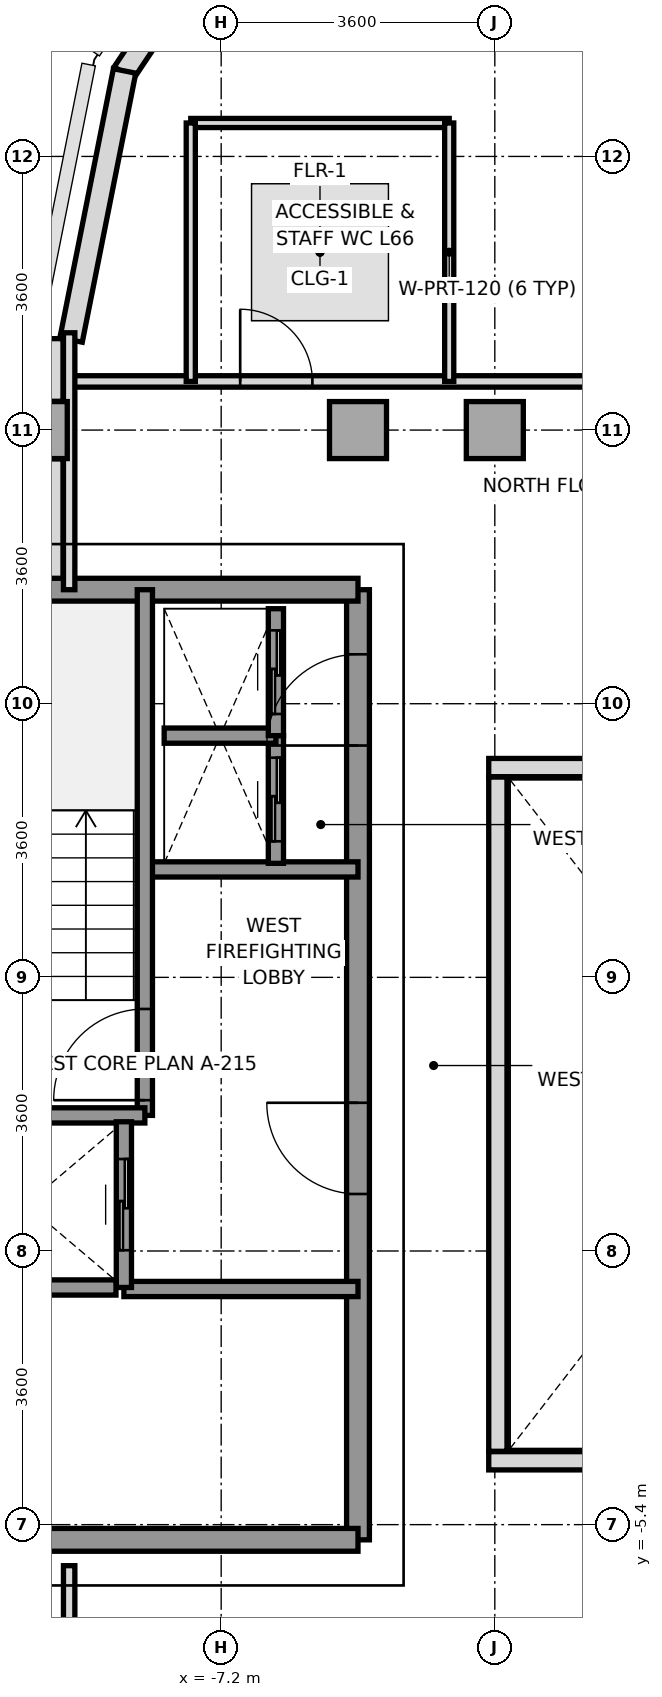
"""IFC4 building model, lengths in metres.
Left out: names, types, materials, properties, quantities, classifications, styles, units other than length and angle.
Written with IfcOpenShell. Run it as: python <this file> out.ifc"""

import sys

from ifc_helpers import new_model, si_unit, direction, frame, frame_2d, origin, origin_2d, place, context, subcontext, project, spatial, rectangle, extrude, source, transform, mapped, element, fill, save


model = new_model("IFC4")
c1 = context("Model", 3, precision=1e-05, world=origin(), true_north=direction((0.0, 1.0)))
c2 = subcontext(c1, "Body", "Model", "MODEL_VIEW")
j1 = project(units=[si_unit("LENGTHUNIT", "METRE"), si_unit("PLANEANGLEUNIT", "RADIAN")], contexts=[c1])
p1 = place(None, origin())
s1 = spatial("IfcSite", under=j1, at=p1, CompositionType="ELEMENT")
p2 = place(p1, origin())
s2 = spatial("IfcBuilding", under=s1, at=p2, CompositionType="ELEMENT")
p3 = place(p2, frame((0.0, 0.0, 239.6)))
s3 = spatial("IfcBuildingStorey", under=s2, at=p3, CompositionType="ELEMENT", Elevation=239.6)
m1 = source(origin(), c2, "Body", "SweptSolid", [
    extrude(rectangle(XDim=0.75, YDim=0.75, at=origin_2d()), origin(), (0.0, 0.0, 1.0), 3.01),
])
for number, where, z_axis, x_axis in (
    (1, (-9.6, 9.0, 0.0), (0.0, 0.0, 1.0), (1.0, 0.0, 0.0)),
    (2, (-5.4, 9.0, 0.0), (0.0, 0.0, 1.0), (1.0, 0.0, 0.0)),
    (3, (-3.6, 9.0, 0.0), (0.0, 0.0, 1.0), (1.0, 0.0, 0.0)),
):
    element("IfcColumn", number, at=place(p3, frame(where, z_axis=z_axis, x_axis=x_axis)), inside=s3, PredefinedType="COLUMN", context=c2, shape_type="MappedRepresentation", body=[
        mapped(m1, transform((0.0, 0.0, 0.0), x_axis=(1.0, 0.0, 0.0), y_axis=(0.0, 1.0, 0.0), z_axis=(0.0, 0.0, 1.0), scale=1.0)),
    ])
p4 = place(p3, frame((-7.305, 15.458, 0.0), z_axis=(0.0, 0.0, 1.0), x_axis=(-0.555604299396, -0.831446848868, 0.0)))
e4 = element("IfcWall", 4, at=p4, inside=s3, PredefinedType="SOLIDWALL", context=c2, shape_type="SweptSolid", body=[
    extrude(rectangle(XDim=2.118, YDim=0.3, at=frame_2d((1.059, 0.0))), origin(), (0.0, 0.0, 1.0), 2.61),
])
p5 = place(p3, frame((-8.471, 13.725, 0.0), z_axis=(0.0, 0.0, 1.0), x_axis=(-0.195114232679, -0.980780523974, 0.0)))
e5 = element("IfcWall", 5, at=p5, inside=s3, PredefinedType="SOLIDWALL", context=c2, shape_type="SweptSolid", body=[
    extrude(rectangle(XDim=3.609, YDim=0.3, at=frame_2d((1.804, 0.0))), origin(), (0.0, 0.0, 1.0), 3.01),
])
p6 = place(p3, frame((-9.4, 6.953, 0.0), z_axis=(0.0, 0.0, 1.0), x_axis=(0.0, 1.0, 0.0)))
e6 = element("IfcWall", 6, at=p6, inside=s3, PredefinedType="PARAPET", context=c2, shape_type="SweptSolid", body=[
    extrude(rectangle(XDim=1.669, YDim=0.24, at=frame_2d((0.834, 0.0))), origin(), (0.0, 0.0, 1.0), 1.15),
])
p7 = place(p3, frame((-9.4, 9.378, 0.0), z_axis=(0.0, 0.0, 1.0), x_axis=(0.0, 1.0, 0.0)))
e7 = element("IfcWall", 7, at=p7, inside=s3, PredefinedType="PARAPET", context=c2, shape_type="SweptSolid", body=[
    extrude(rectangle(XDim=0.825, YDim=0.24, at=frame_2d((0.413, 0.0))), origin(), (0.0, 0.0, 1.0), 1.15),
])
p8 = place(p3, frame((-5.4, -5.6, 0.0), z_axis=(0.0, 0.0, 1.0), x_axis=(0.0, 1.0, 0.0)))
e8 = element("IfcWall", 8, at=p8, inside=s3, PredefinedType="SHEAR", context=c2, shape_type="SweptSolid", body=[
    extrude(rectangle(XDim=12.5, YDim=0.3, at=frame_2d((6.25, 0.0))), origin(), (0.0, 0.0, 1.0), 3.01),
])
p9 = place(p8, frame((4.55, 0.0, 0.0)))
e9 = element("IfcOpeningElement", 9, at=p9, cuts=e8, PredefinedType="OPENING", context=c2, shape_type="SweptSolid", body=[
    extrude(rectangle(XDim=1.2, YDim=2.2, at=frame_2d((0.6, 1.1))), frame((0.0, 0.16, 0.0), z_axis=(0.0, -1.0, 0.0), x_axis=(1.0, 0.0, 0.0)), (0.0, 0.0, 1.0), 0.32),
])
p10 = place(p8, frame((10.45, 0.0, 0.0)))
e10 = element("IfcOpeningElement", 10, at=p10, cuts=e8, PredefinedType="OPENING", context=c2, shape_type="SweptSolid", body=[
    extrude(rectangle(XDim=1.2, YDim=2.2, at=frame_2d((0.6, 1.1))), frame((0.0, 0.16, 0.0), z_axis=(0.0, -1.0, 0.0), x_axis=(1.0, 0.0, 0.0)), (0.0, 0.0, 1.0), 0.32),
])
p11 = place(p3, frame((-11.356, 6.9, 0.0), z_axis=(0.0, 0.0, 1.0), x_axis=(1.0, 0.0, 0.0)))
e11 = element("IfcWall", 11, at=p11, inside=s3, PredefinedType="SHEAR", context=c2, shape_type="SweptSolid", body=[
    extrude(rectangle(XDim=5.956, YDim=0.3, at=frame_2d((2.978, 0.0))), origin(), (0.0, 0.0, 1.0), 3.01),
])
p12 = place(p3, frame((-13.2, -5.6, 0.0), z_axis=(0.0, 0.0, 1.0), x_axis=(1.0, 0.0, 0.0)))
e12 = element("IfcWall", 12, at=p12, inside=s3, PredefinedType="SHEAR", context=c2, shape_type="SweptSolid", body=[
    extrude(rectangle(XDim=7.8, YDim=0.3, at=frame_2d((3.9, 0.0))), origin(), (0.0, 0.0, 1.0), 3.01),
])
p13 = place(p3, frame((-8.18, 3.22, 0.0), z_axis=(0.0, 0.0, 1.0), x_axis=(1.0, 0.0, 0.0)))
e13 = element("IfcWall", 13, at=p13, inside=s3, PredefinedType="SOLIDWALL", context=c2, shape_type="SweptSolid", body=[
    extrude(rectangle(XDim=2.78, YDim=0.2, at=frame_2d((1.39, 0.0))), origin(), (0.0, 0.0, 1.0), 3.01),
])
p14 = place(p3, frame((-8.48, -2.3, 0.0), z_axis=(0.0, 0.0, 1.0), x_axis=(1.0, 0.0, 0.0)))
e14 = element("IfcWall", 14, at=p14, inside=s3, PredefinedType="SOLIDWALL", context=c2, shape_type="SweptSolid", body=[
    extrude(rectangle(XDim=3.08, YDim=0.2, at=frame_2d((1.54, 0.0))), origin(), (0.0, 0.0, 1.0), 3.01),
])
p15 = place(p3, frame((-8.204, -0.016, 0.0), z_axis=(0.0, 0.0, 1.0), x_axis=(0.0, 1.0, 0.0)))
e15 = element("IfcWall", 15, at=p15, inside=s3, PredefinedType="SOLIDWALL", context=c2, shape_type="SweptSolid", body=[
    extrude(rectangle(XDim=6.916, YDim=0.2, at=frame_2d((3.458, 0.0))), origin(), (0.0, 0.0, 1.0), 3.01),
])
p16 = place(p15, frame((0.2, 0.0, 0.0)))
e16 = element("IfcOpeningElement", 16, at=p16, cuts=e15, PredefinedType="OPENING", context=c2, shape_type="SweptSolid", body=[
    extrude(rectangle(XDim=1.2, YDim=2.2, at=frame_2d((0.6, 1.1))), frame((0.0, 0.11, 0.0), z_axis=(0.0, -1.0, 0.0), x_axis=(1.0, 0.0, 0.0)), (0.0, 0.0, 1.0), 0.22),
])
p17 = place(p3, frame((-11.356, -0.016, 0.0), z_axis=(0.0, 0.0, 1.0), x_axis=(1.0, 0.0, 0.0)))
e17 = element("IfcWall", 17, at=p17, inside=s3, PredefinedType="SOLIDWALL", context=c2, shape_type="SweptSolid", body=[
    extrude(rectangle(XDim=3.152, YDim=0.2, at=frame_2d((1.576, 0.0))), origin(), (0.0, 0.0, 1.0), 3.01),
])
p18 = place(p3, frame((-8.48, -2.28, 0.0), z_axis=(0.0, 0.0, 1.0), x_axis=(0.0, 1.0, 0.0)))
e18 = element("IfcWall", 18, at=p18, inside=s3, PredefinedType="SOLIDWALL", context=c2, shape_type="SweptSolid", body=[
    extrude(rectangle(XDim=2.18, YDim=0.2, at=frame_2d((1.09, 0.0))), origin(), (0.0, 0.0, 1.0), 3.01),
])
p19 = place(p18, frame((0.49, 0.0, 0.0)))
e19 = element("IfcOpeningElement", 19, at=p19, cuts=e18, PredefinedType="OPENING", context=c2, shape_type="SweptSolid", body=[
    extrude(rectangle(XDim=1.2, YDim=2.2, at=frame_2d((0.6, 1.1))), frame((0.0, 0.11, 0.0), z_axis=(0.0, -1.0, 0.0), x_axis=(1.0, 0.0, 0.0)), (0.0, 0.0, 1.0), 0.22),
])
p20 = place(p3, frame((-10.946, -2.28, 0.0), z_axis=(0.0, 0.0, 1.0), x_axis=(1.0, 0.0, 0.0)))
e20 = element("IfcWall", 20, at=p20, inside=s3, PredefinedType="SOLIDWALL", context=c2, shape_type="SweptSolid", body=[
    extrude(rectangle(XDim=2.362, YDim=0.2, at=frame_2d((1.181, 0.0))), origin(), (0.0, 0.0, 1.0), 3.01),
])
p21 = place(p3, frame((-6.48, 3.3, 0.0), z_axis=(0.0, 0.0, 1.0), x_axis=(0.0, 1.0, 0.0)))
e21 = element("IfcWall", 21, at=p21, inside=s3, PredefinedType="SOLIDWALL", context=c2, shape_type="SweptSolid", body=[
    extrude(rectangle(XDim=1.68, YDim=0.2, at=frame_2d((0.84, 0.0))), origin(), (0.0, 0.0, 1.0), 3.01),
])
p22 = place(p21, frame((0.29, 0.0, 0.0)))
e22 = element("IfcOpeningElement", 22, at=p22, cuts=e21, PredefinedType="OPENING", context=c2, shape_type="SweptSolid", body=[
    extrude(rectangle(XDim=1.1, YDim=2.2, at=frame_2d((0.55, 1.1))), frame((0.0, 0.11, 0.0), z_axis=(0.0, -1.0, 0.0), x_axis=(1.0, 0.0, 0.0)), (0.0, 0.0, 1.0), 0.22),
])
p23 = place(p3, frame((-7.95, 4.98, 0.0), z_axis=(0.0, 0.0, 1.0), x_axis=(1.0, 0.0, 0.0)))
e23 = element("IfcWall", 23, at=p23, inside=s3, PredefinedType="SOLIDWALL", context=c2, shape_type="SweptSolid", body=[
    extrude(rectangle(XDim=1.47, YDim=0.2, at=frame_2d((0.735, 0.0))), origin(), (0.0, 0.0, 1.0), 3.01),
])
p24 = place(p3, frame((-6.48, 4.98, 0.0), z_axis=(0.0, 0.0, 1.0), x_axis=(0.0, 1.0, 0.0)))
e24 = element("IfcWall", 24, at=p24, inside=s3, PredefinedType="SOLIDWALL", context=c2, shape_type="SweptSolid", body=[
    extrude(rectangle(XDim=1.67, YDim=0.2, at=frame_2d((0.835, 0.0))), origin(), (0.0, 0.0, 1.0), 3.01),
])
p25 = place(p24, frame((0.285, 0.0, 0.0)))
e25 = element("IfcOpeningElement", 25, at=p25, cuts=e24, PredefinedType="OPENING", context=c2, shape_type="SweptSolid", body=[
    extrude(rectangle(XDim=1.1, YDim=2.2, at=frame_2d((0.55, 1.1))), frame((0.0, 0.11, 0.0), z_axis=(0.0, -1.0, 0.0), x_axis=(1.0, 0.0, 0.0)), (0.0, 0.0, 1.0), 0.22),
])
p26 = place(p3, frame((-9.2, 9.64, 0.0), z_axis=(0.0, 0.0, 1.0), x_axis=(1.0, 0.0, 0.0)))
e26 = element("IfcWall", 26, at=p26, inside=s3, PredefinedType="PARTITIONING", context=c2, shape_type="SweptSolid", body=[
    extrude(rectangle(XDim=18.4, YDim=0.15, at=frame_2d((9.2, 0.0))), origin(), (0.0, 0.0, 1.0), 3.01),
])
p27 = place(p26, frame((2.25, 0.0, 0.0)))
e27 = element("IfcOpeningElement", 27, at=p27, cuts=e26, PredefinedType="OPENING", context=c2, shape_type="SweptSolid", body=[
    extrude(rectangle(XDim=0.95, YDim=2.15, at=frame_2d((0.475, 1.075))), frame((0.0, 0.085, 0.0), z_axis=(0.0, -1.0, 0.0), x_axis=(1.0, 0.0, 0.0)), (0.0, 0.0, 1.0), 0.17),
])
p28 = place(p26, frame((9.8, 0.0, 0.0)))
e28 = element("IfcOpeningElement", 28, at=p28, cuts=e26, PredefinedType="OPENING", context=c2, shape_type="SweptSolid", body=[
    extrude(rectangle(XDim=1.1, YDim=2.2, at=frame_2d((0.55, 1.1))), frame((0.0, 0.085, 0.0), z_axis=(0.0, -1.0, 0.0), x_axis=(1.0, 0.0, 0.0)), (0.0, 0.0, 1.0), 0.17),
])
p29 = place(p26, frame((15.15, 0.0, 0.0)))
e29 = element("IfcOpeningElement", 29, at=p29, cuts=e26, PredefinedType="OPENING", context=c2, shape_type="SweptSolid", body=[
    extrude(rectangle(XDim=0.95, YDim=2.15, at=frame_2d((0.475, 1.075))), frame((0.0, 0.085, 0.0), z_axis=(0.0, -1.0, 0.0), x_axis=(1.0, 0.0, 0.0)), (0.0, 0.0, 1.0), 0.17),
])
p30 = place(p3, frame((-9.2, 6.9, 0.0), z_axis=(0.0, 0.0, 1.0), x_axis=(0.0, 1.0, 0.0)))
e30 = element("IfcWall", 30, at=p30, inside=s3, PredefinedType="PARTITIONING", context=c2, shape_type="SweptSolid", body=[
    extrude(rectangle(XDim=3.38, YDim=0.15, at=frame_2d((1.69, 0.0))), origin(), (0.0, 0.0, 1.0), 2.61),
])
for number, where, z_axis, x_axis in (
    (31, (-7.6, 13.04, 0.0), (0.0, 0.0, 1.0), (1.0, 0.0, 0.0)),
    (32, (-7.6, 9.64, 0.0), (0.0, 0.0, 1.0), (0.0, 1.0, 0.0)),
    (33, (-4.2, 9.64, 0.0), (0.0, 0.0, 1.0), (0.0, 1.0, 0.0)),
):
    element("IfcWall", number, at=place(p3, frame(where, z_axis=z_axis, x_axis=x_axis)), inside=s3, PredefinedType="PARTITIONING", context=c2, shape_type="SweptSolid", body=[
        extrude(rectangle(XDim=3.4, YDim=0.12, at=frame_2d((1.7, 0.0))), origin(), (0.0, 0.0, 1.0), 3.01),
    ])
p31 = place(p3, frame((-9.2, -10.28, 0.0), z_axis=(0.0, 0.0, 1.0), x_axis=(0.0, 1.0, 0.0)))
e34 = element("IfcWall", 34, at=p31, inside=s3, PredefinedType="PARTITIONING", context=c2, shape_type="SweptSolid", body=[
    extrude(rectangle(XDim=4.34, YDim=0.15, at=frame_2d((2.17, 0.0))), origin(), (0.0, 0.0, 1.0), 2.61),
])
for number, where, z_axis, x_axis in (
    (35, (-3.68, -4.56, 0.0), (0.0, 0.0, 1.0), (1.0, 0.0, 0.0)),
    (36, (-3.68, 4.56, 0.0), (0.0, 0.0, 1.0), (1.0, 0.0, 0.0)),
):
    element("IfcWall", number, at=place(p3, frame(where, z_axis=z_axis, x_axis=x_axis)), inside=s3, PredefinedType="PARAPET", context=c2, shape_type="SweptSolid", body=[
        extrude(rectangle(XDim=7.36, YDim=0.24, at=frame_2d((3.68, 0.0))), origin(), (0.0, 0.0, 1.0), 1.15),
    ])
p32 = place(p3, frame((-3.56, -4.435, 0.0), z_axis=(0.0, 0.0, 1.0), x_axis=(0.0, 1.0, 0.0)))
e37 = element("IfcWall", 37, at=p32, inside=s3, PredefinedType="PARAPET", context=c2, shape_type="SweptSolid", body=[
    extrude(rectangle(XDim=8.87, YDim=0.24, at=frame_2d((4.435, 0.0))), origin(), (0.0, 0.0, 1.0), 1.15),
])
m2 = source(origin(), c2, "Body", "SweptSolid", [
    extrude(rectangle(XDim=1.2, YDim=2.2, at=frame_2d((0.6, 1.1))), frame((0.0, 0.025, 0.0), z_axis=(0.0, -1.0, 0.0), x_axis=(1.0, 0.0, 0.0)), (0.0, 0.0, 1.0), 0.05),
])
p33 = place(p16, origin())
e38 = element("IfcDoor", 38, at=p33, inside=s3, OperationType="SINGLE_SWING_LEFT", PredefinedType="DOOR", context=c2, shape_type="MappedRepresentation", body=[
    mapped(m2, transform((0.0, 0.0, 0.0), x_axis=(1.0, 0.0, 0.0), y_axis=(0.0, 1.0, 0.0), z_axis=(0.0, 0.0, 1.0), scale=1.0)),
])
fill(e16, e38)
p34 = place(p9, origin())
e39 = element("IfcDoor", 39, at=p34, inside=s3, OperationType="SINGLE_SWING_RIGHT", PredefinedType="DOOR", context=c2, shape_type="MappedRepresentation", body=[
    mapped(m2, transform((0.0, 0.0, 0.0), x_axis=(1.0, 0.0, 0.0), y_axis=(0.0, 1.0, 0.0), z_axis=(0.0, 0.0, 1.0), scale=1.0)),
])
fill(e9, e39)
p35 = place(p10, origin())
e40 = element("IfcDoor", 40, at=p35, inside=s3, OperationType="SINGLE_SWING_LEFT", PredefinedType="DOOR", context=c2, shape_type="MappedRepresentation", body=[
    mapped(m2, transform((0.0, 0.0, 0.0), x_axis=(1.0, 0.0, 0.0), y_axis=(0.0, 1.0, 0.0), z_axis=(0.0, 0.0, 1.0), scale=1.0)),
])
fill(e10, e40)
p36 = place(p19, origin())
e41 = element("IfcDoor", 41, at=p36, inside=s3, OperationType="SLIDING_TO_RIGHT", PredefinedType="DOOR", context=c2, shape_type="MappedRepresentation", body=[
    mapped(m2, transform((0.0, 0.0, 0.0), x_axis=(1.0, 0.0, 0.0), y_axis=(0.0, 1.0, 0.0), z_axis=(0.0, 0.0, 1.0), scale=1.0)),
])
fill(e19, e41)
m3 = source(origin(), c2, "Body", "SweptSolid", [
    extrude(rectangle(XDim=1.1, YDim=2.2, at=frame_2d((0.55, 1.1))), frame((0.0, 0.025, 0.0), z_axis=(0.0, -1.0, 0.0), x_axis=(1.0, 0.0, 0.0)), (0.0, 0.0, 1.0), 0.05),
])
p37 = place(p22, origin())
e42 = element("IfcDoor", 42, at=p37, inside=s3, OperationType="SLIDING_TO_LEFT", PredefinedType="DOOR", context=c2, shape_type="MappedRepresentation", body=[
    mapped(m3, transform((0.0, 0.0, 0.0), x_axis=(1.0, 0.0, 0.0), y_axis=(0.0, 1.0, 0.0), z_axis=(0.0, 0.0, 1.0), scale=1.0)),
])
fill(e22, e42)
p38 = place(p25, origin())
e43 = element("IfcDoor", 43, at=p38, inside=s3, OperationType="SLIDING_TO_LEFT", PredefinedType="DOOR", context=c2, shape_type="MappedRepresentation", body=[
    mapped(m3, transform((0.0, 0.0, 0.0), x_axis=(1.0, 0.0, 0.0), y_axis=(0.0, 1.0, 0.0), z_axis=(0.0, 0.0, 1.0), scale=1.0)),
])
fill(e25, e43)
m4 = source(origin(), c2, "Body", "SweptSolid", [
    extrude(rectangle(XDim=0.95, YDim=2.15, at=frame_2d((0.475, 1.075))), frame((0.0, 0.025, 0.0), z_axis=(0.0, -1.0, 0.0), x_axis=(1.0, 0.0, 0.0)), (0.0, 0.0, 1.0), 0.05),
])
p39 = place(p27, origin())
e44 = element("IfcDoor", 44, at=p39, inside=s3, OperationType="SINGLE_SWING_LEFT", PredefinedType="DOOR", context=c2, shape_type="MappedRepresentation", body=[
    mapped(m4, transform((0.0, 0.0, 0.0), x_axis=(1.0, 0.0, 0.0), y_axis=(0.0, 1.0, 0.0), z_axis=(0.0, 0.0, 1.0), scale=1.0)),
])
fill(e27, e44)
save(model, sys.argv[1])
